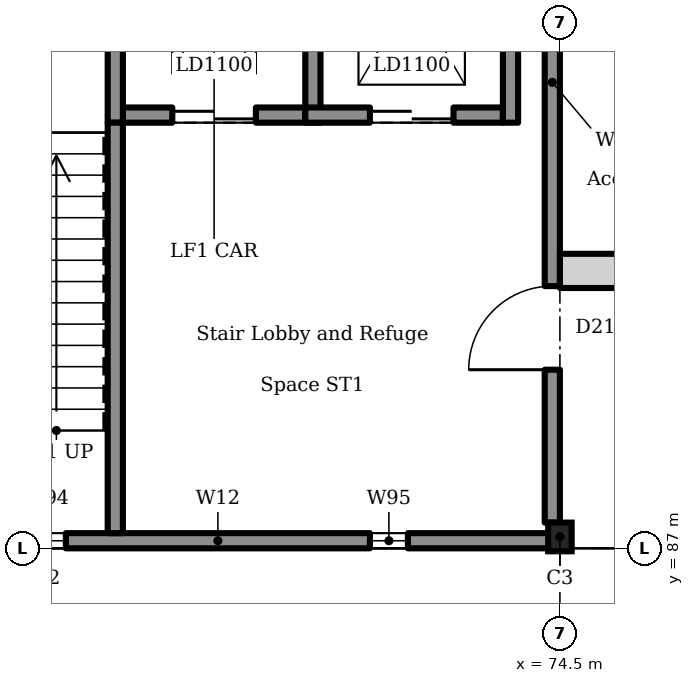
"""IFC4 building model, lengths in metres.
Left out: names, types, materials, properties, quantities, classifications, styles, units other than length and angle.
Written with IfcOpenShell. Run it as: python <this file> out.ifc"""

import sys

from ifc_helpers import new_model, si_unit, direction, frame, frame_2d, origin, origin_2d, place, context, subcontext, project, spatial, rectangle, i_section, extrude, element, fill, save


model = new_model("IFC4")
c1 = context("Model", 3, precision=1e-05, world=origin(), true_north=direction((0.0, 1.0)))
c2 = subcontext(c1, "Body", "Model", "MODEL_VIEW")
j1 = project(units=[si_unit("LENGTHUNIT", "METRE"), si_unit("PLANEANGLEUNIT", "RADIAN")], contexts=[c1])
p1 = place(None, origin())
s1 = spatial("IfcSite", under=j1, at=p1, CompositionType="ELEMENT")
p2 = place(p1, origin())
s2 = spatial("IfcBuilding", under=s1, at=p2, CompositionType="ELEMENT")
p3 = place(p2, origin())
s3 = spatial("IfcBuildingStorey", under=s2, at=p3, CompositionType="ELEMENT", Elevation=0.0)
p4 = place(p3, frame((68.75, 92.7, -1.1), z_axis=(0.0, 0.0, 1.0), x_axis=(1.0, 0.0, 0.0)))
e1 = element("IfcWall", 1, at=p4, inside=s3, PredefinedType="SOLIDWALL", context=c2, shape_type="SweptSolid", body=[
    extrude(rectangle(XDim=2.4, YDim=0.2, at=frame_2d((1.2, 0.0))), origin(), (0.0, 0.0, 1.0), 6.5),
])
p5 = place(p4, frame((0.65, 0.0, 1.1)))
e2 = element("IfcOpeningElement", 2, at=p5, cuts=e1, PredefinedType="OPENING", context=c2, shape_type="SweptSolid", body=[
    extrude(rectangle(XDim=1.1, YDim=2.1, at=frame_2d((0.55, 1.05))), frame((0.0, 0.11, 0.0), z_axis=(0.0, -1.0, 0.0), x_axis=(1.0, 0.0, 0.0)), (0.0, 0.0, 1.0), 0.22),
])
for number, where, z_axis, x_axis in (
    (3, (68.65, 92.6, -1.1), (0.0, 0.0, 1.0), (0.0, 1.0, 0.0)),
    (4, (71.25, 92.6, -1.1), (0.0, 0.0, 1.0), (0.0, 1.0, 0.0)),
):
    element("IfcWall", number, at=place(p3, frame(where, z_axis=z_axis, x_axis=x_axis)), inside=s3, PredefinedType="SOLIDWALL", context=c2, shape_type="SweptSolid", body=[
        extrude(rectangle(XDim=3.4, YDim=0.2, at=frame_2d((1.7, 0.0))), origin(), (0.0, 0.0, 1.0), 6.5),
    ])
p6 = place(p3, frame((71.15, 92.7, -1.1), z_axis=(0.0, 0.0, 1.0), x_axis=(1.0, 0.0, 0.0)))
e5 = element("IfcWall", 5, at=p6, inside=s3, PredefinedType="SOLIDWALL", context=c2, shape_type="SweptSolid", body=[
    extrude(rectangle(XDim=2.6, YDim=0.2, at=frame_2d((1.3, 0.0))), origin(), (0.0, 0.0, 1.0), 6.5),
])
p7 = place(p6, frame((0.85, 0.0, 1.1)))
e6 = element("IfcOpeningElement", 6, at=p7, cuts=e5, PredefinedType="OPENING", context=c2, shape_type="SweptSolid", body=[
    extrude(rectangle(XDim=1.1, YDim=2.1, at=frame_2d((0.55, 1.05))), frame((0.0, 0.11, 0.0), z_axis=(0.0, -1.0, 0.0), x_axis=(1.0, 0.0, 0.0)), (0.0, 0.0, 1.0), 0.22),
])
p8 = place(p3, frame((73.85, 92.6, -1.1), z_axis=(0.0, 0.0, 1.0), x_axis=(0.0, 1.0, 0.0)))
e7 = element("IfcWall", 7, at=p8, inside=s3, PredefinedType="SOLIDWALL", context=c2, shape_type="SweptSolid", body=[
    extrude(rectangle(XDim=3.4, YDim=0.2, at=frame_2d((1.7, 0.0))), origin(), (0.0, 0.0, 1.0), 6.5),
])
p9 = place(p3, frame((74.5, 87.15, 0.0), z_axis=(0.0, 0.0, 1.0), x_axis=(1.0, 0.0, 0.0)))
e8 = element("IfcColumn", 8, at=p9, inside=s3, PredefinedType="COLUMN", context=c2, shape_type="SweptSolid", body=[
    extrude(i_section(OverallWidth=0.309, OverallDepth=0.377, WebThickness=0.021, FlangeThickness=0.04, FilletRadius=0.027, at=origin_2d()), origin(), (0.0, 0.0, 1.0), 5.4),
])
p10 = place(p3, frame((74.5, 90.65, 0.0), z_axis=(0.0, 0.0, 1.0), x_axis=(1.0, 0.0, 0.0)))
e9 = element("IfcWall", 9, at=p10, inside=s3, PredefinedType="SOLIDWALL", context=c2, shape_type="SweptSolid", body=[
    extrude(rectangle(XDim=27.0, YDim=0.45, at=frame_2d((13.5, 0.0))), origin(), (0.0, 0.0, 1.0), 4.76),
])
p11 = place(p10, frame((12.3, 0.0, 0.0)))
e10 = element("IfcOpeningElement", 10, at=p11, cuts=e9, PredefinedType="OPENING", context=c2, shape_type="SweptSolid", body=[
    extrude(rectangle(XDim=2.4, YDim=2.4, at=frame_2d((1.2, 1.2))), frame((0.0, 0.235, 0.0), z_axis=(0.0, -1.0, 0.0), x_axis=(1.0, 0.0, 0.0)), (0.0, 0.0, 1.0), 0.47),
])
p12 = place(p10, frame((3.5, 0.0, 0.9)))
e11 = element("IfcOpeningElement", 11, at=p12, cuts=e9, PredefinedType="OPENING", context=c2, shape_type="SweptSolid", body=[
    extrude(rectangle(XDim=1.8, YDim=2.8, at=frame_2d((0.9, 1.4))), frame((0.0, 0.235, 0.0), z_axis=(0.0, -1.0, 0.0), x_axis=(1.0, 0.0, 0.0)), (0.0, 0.0, 1.0), 0.47),
])
p13 = place(p10, frame((8.1, 0.0, 0.9)))
e12 = element("IfcOpeningElement", 12, at=p13, cuts=e9, PredefinedType="OPENING", context=c2, shape_type="SweptSolid", body=[
    extrude(rectangle(XDim=1.8, YDim=2.8, at=frame_2d((0.9, 1.4))), frame((0.0, 0.235, 0.0), z_axis=(0.0, -1.0, 0.0), x_axis=(1.0, 0.0, 0.0)), (0.0, 0.0, 1.0), 0.47),
])
p14 = place(p10, frame((17.1, 0.0, 0.9)))
e13 = element("IfcOpeningElement", 13, at=p14, cuts=e9, PredefinedType="OPENING", context=c2, shape_type="SweptSolid", body=[
    extrude(rectangle(XDim=1.8, YDim=2.8, at=frame_2d((0.9, 1.4))), frame((0.0, 0.235, 0.0), z_axis=(0.0, -1.0, 0.0), x_axis=(1.0, 0.0, 0.0)), (0.0, 0.0, 1.0), 0.47),
])
p15 = place(p10, frame((21.6, 0.0, 0.9)))
e14 = element("IfcOpeningElement", 14, at=p15, cuts=e9, PredefinedType="OPENING", context=c2, shape_type="SweptSolid", body=[
    extrude(rectangle(XDim=1.8, YDim=2.8, at=frame_2d((0.9, 1.4))), frame((0.0, 0.235, 0.0), z_axis=(0.0, -1.0, 0.0), x_axis=(1.0, 0.0, 0.0)), (0.0, 0.0, 1.0), 0.47),
])
p16 = place(p3, frame((74.4, 87.338, 0.0), z_axis=(0.0, 0.0, 1.0), x_axis=(0.0, 1.0, 0.0)))
e15 = element("IfcWall", 15, at=p16, inside=s3, PredefinedType="SOLIDWALL", context=c2, shape_type="SweptSolid", body=[
    extrude(rectangle(XDim=8.473, YDim=0.2, at=frame_2d((4.237, 0.0))), origin(), (0.0, 0.0, 1.0), 5.2),
])
p17 = place(p16, frame((2.011, 0.0, 0.0)))
e16 = element("IfcOpeningElement", 16, at=p17, cuts=e15, PredefinedType="OPENING", context=c2, shape_type="SweptSolid", body=[
    extrude(rectangle(XDim=1.1, YDim=2.1, at=frame_2d((0.55, 1.05))), frame((0.0, 0.11, 0.0), z_axis=(0.0, -1.0, 0.0), x_axis=(1.0, 0.0, 0.0)), (0.0, 0.0, 1.0), 0.22),
])
p18 = place(p3, frame((65.511, 87.1, 0.0), z_axis=(0.0, 0.0, 1.0), x_axis=(1.0, 0.0, 0.0)))
e17 = element("IfcWall", 17, at=p18, inside=s3, PredefinedType="SOLIDWALL", context=c2, shape_type="SweptSolid", body=[
    extrude(rectangle(XDim=8.978, YDim=0.2, at=frame_2d((4.489, 0.0))), origin(), (0.0, 0.0, 1.0), 5.2),
])
p19 = place(p18, frame((1.989, 0.0, 3.35)))
e18 = element("IfcOpeningElement", 18, at=p19, cuts=e17, PredefinedType="OPENING", context=c2, shape_type="SweptSolid", body=[
    extrude(rectangle(XDim=0.5, YDim=1.2, at=frame_2d((0.25, 0.6))), frame((0.0, 0.11, 0.0), z_axis=(0.0, -1.0, 0.0), x_axis=(1.0, 0.0, 0.0)), (0.0, 0.0, 1.0), 0.22),
])
p20 = place(p18, frame((6.489, 0.0, 3.35)))
e19 = element("IfcOpeningElement", 19, at=p20, cuts=e17, PredefinedType="OPENING", context=c2, shape_type="SweptSolid", body=[
    extrude(rectangle(XDim=0.5, YDim=1.2, at=frame_2d((0.25, 0.6))), frame((0.0, 0.11, 0.0), z_axis=(0.0, -1.0, 0.0), x_axis=(1.0, 0.0, 0.0)), (0.0, 0.0, 1.0), 0.22),
])
p21 = place(p3, frame((68.65, 87.2, 0.0), z_axis=(0.0, 0.0, 1.0), x_axis=(0.0, 1.0, 0.0)))
e20 = element("IfcWall", 20, at=p21, inside=s3, PredefinedType="SOLIDWALL", context=c2, shape_type="SweptSolid", body=[
    extrude(rectangle(XDim=5.4, YDim=0.2, at=frame_2d((2.7, 0.0))), origin(), (0.0, 0.0, 1.0), 5.2),
])
p22 = place(p5, origin())
e21 = element("IfcDoor", 21, at=p22, inside=s3, OperationType="SLIDING_TO_LEFT", PredefinedType="DOOR", context=c2, shape_type="SweptSolid", body=[
    extrude(rectangle(XDim=1.1, YDim=2.1, at=frame_2d((0.55, 1.05))), frame((0.0, 0.025, 0.0), z_axis=(0.0, -1.0, 0.0), x_axis=(1.0, 0.0, 0.0)), (0.0, 0.0, 1.0), 0.05),
])
fill(e2, e21)
p23 = place(p7, origin())
e22 = element("IfcDoor", 22, at=p23, inside=s3, OperationType="SLIDING_TO_LEFT", PredefinedType="DOOR", context=c2, shape_type="SweptSolid", body=[
    extrude(rectangle(XDim=1.1, YDim=2.1, at=frame_2d((0.55, 1.05))), frame((0.0, 0.025, 0.0), z_axis=(0.0, -1.0, 0.0), x_axis=(1.0, 0.0, 0.0)), (0.0, 0.0, 1.0), 0.05),
])
fill(e6, e22)
p24 = place(p19, origin())
e23 = element("IfcWindow", 23, at=p24, inside=s3, PartitioningType="SINGLE_PANEL", PredefinedType="WINDOW", context=c2, shape_type="SweptSolid", body=[
    extrude(rectangle(XDim=0.5, YDim=1.2, at=frame_2d((0.25, 0.6))), frame((0.0, 0.03, 0.0), z_axis=(0.0, -1.0, 0.0), x_axis=(1.0, 0.0, 0.0)), (0.0, 0.0, 1.0), 0.06),
])
fill(e18, e23)
p25 = place(p20, origin())
e24 = element("IfcWindow", 24, at=p25, inside=s3, PartitioningType="SINGLE_PANEL", PredefinedType="WINDOW", context=c2, shape_type="SweptSolid", body=[
    extrude(rectangle(XDim=0.5, YDim=1.2, at=frame_2d((0.25, 0.6))), frame((0.0, 0.03, 0.0), z_axis=(0.0, -1.0, 0.0), x_axis=(1.0, 0.0, 0.0)), (0.0, 0.0, 1.0), 0.06),
])
fill(e19, e24)
p26 = place(p17, origin())
e25 = element("IfcDoor", 25, at=p26, inside=s3, OperationType="SINGLE_SWING_RIGHT", PredefinedType="DOOR", context=c2, shape_type="SweptSolid", body=[
    extrude(rectangle(XDim=1.1, YDim=2.1, at=frame_2d((0.55, 1.05))), frame((0.0, 0.025, 0.0), z_axis=(0.0, -1.0, 0.0), x_axis=(1.0, 0.0, 0.0)), (0.0, 0.0, 1.0), 0.05),
])
fill(e16, e25)
save(model, sys.argv[1])
